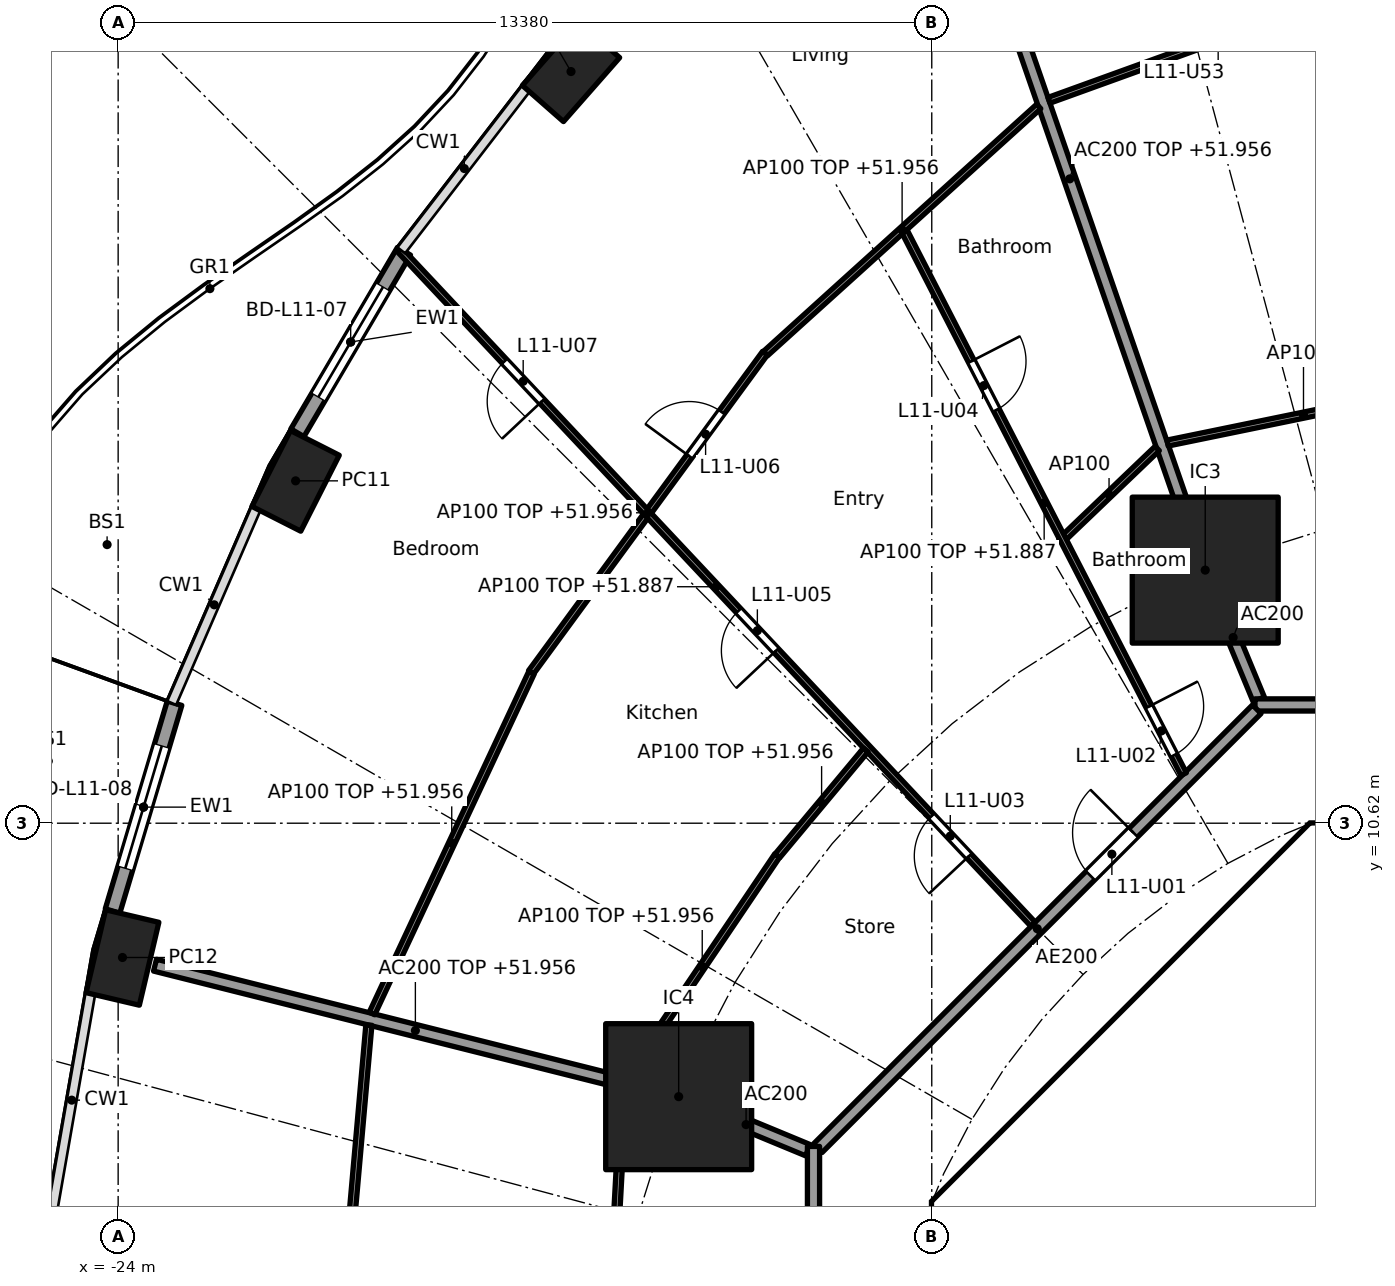
"""IFC4 building model, lengths in metres.
Left out: names, types, materials, properties, quantities, classifications, styles, units other than length and angle.
Written with IfcOpenShell. Run it as: python <this file> out.ifc"""

import sys

from ifc_helpers import new_model, si_unit, direction, frame, frame_2d, origin, origin_2d, place, context, subcontext, project, spatial, polyline, rectangle, hollow_rectangle, outline, extrude, element, fill, save


model = new_model("IFC4")
c1 = context("Model", 3, precision=1e-05, world=origin(), true_north=direction((0.0, 1.0)))
c2 = subcontext(c1, "Body", "Model", "MODEL_VIEW")
j1 = project(units=[si_unit("LENGTHUNIT", "METRE"), si_unit("PLANEANGLEUNIT", "RADIAN")], contexts=[c1])
p1 = place(None, origin())
s1 = spatial("IfcSite", under=j1, at=p1, CompositionType="ELEMENT")
p2 = place(p1, origin())
s2 = spatial("IfcBuilding", under=s1, at=p2, CompositionType="ELEMENT")
p3 = place(p2, frame((0.0, 0.0, 49.2)))
s3 = spatial("IfcBuildingStorey", under=s2, at=p3, CompositionType="ELEMENT", Elevation=49.2)
for number, where, z_axis, x_axis in (
    (1, (-16.552, 22.981, 0.0), (0.0, 0.0, 1.0), (-0.66, -0.751, 0.0)),
    (2, (-21.082, 16.25, 0.0), (0.0, 0.0, 1.0), (-0.452, -0.892, 0.0)),
    (3, (-23.929, 8.412, 0.0), (0.0, 0.0, 1.0), (-0.229, -0.973, 0.0)),
):
    element("IfcColumn", number, at=place(p3, frame(where, z_axis=z_axis, x_axis=x_axis)), inside=s3, PredefinedType="COLUMN", context=c2, shape_type="SweptSolid", body=[
        extrude(hollow_rectangle(XDim=1.4, YDim=0.9, WallThickness=0.05, at=origin_2d()), origin(), (0.0, 0.0, 1.0), 3.7),
    ])
for number, where, z_axis, x_axis in (
    (4, (-6.123, 14.782, 0.0), (0.0, 0.0, 1.0), (1.0, 0.0, 0.0)),
    (5, (-14.782, 6.123, 0.0), (0.0, 0.0, 1.0), (1.0, 0.0, 0.0)),
):
    element("IfcColumn", number, at=place(p3, frame(where, z_axis=z_axis, x_axis=x_axis)), inside=s3, PredefinedType="COLUMN", context=c2, shape_type="SweptSolid", body=[
        extrude(rectangle(XDim=2.4, YDim=2.4, at=origin_2d()), origin(), (0.0, 0.0, 1.0), 3.7),
    ])
p4 = place(p3, frame((-21.052, 17.04, 0.0), z_axis=(0.0, 0.0, 1.0), x_axis=(0.506311160839, 0.862350861546, 0.0)))
e6 = element("IfcWall", 6, at=p4, inside=s3, PredefinedType="SOLIDWALL", context=c2, shape_type="SweptSolid", body=[
    extrude(rectangle(XDim=3.462, YDim=0.25, at=frame_2d((1.731, 0.0))), origin(), (0.0, 0.0, 1.0), 3.44),
])
p5 = place(p4, frame((0.681, 0.0, 0.0)))
e7 = element("IfcOpeningElement", 7, at=p5, cuts=e6, PredefinedType="OPENING", context=c2, shape_type="SweptSolid", body=[
    extrude(rectangle(XDim=2.1, YDim=2.4, at=frame_2d((1.05, 1.2))), frame((0.0, 0.135, 0.0), z_axis=(0.0, -1.0, 0.0), x_axis=(1.0, 0.0, 0.0)), (0.0, 0.0, 1.0), 0.27),
])
p6 = place(p3, frame((-24.092, 9.176, 0.0), z_axis=(0.0, 0.0, 1.0), x_axis=(0.285871309426, 0.958268018065, 0.0)))
e8 = element("IfcWall", 8, at=p6, inside=s3, PredefinedType="SOLIDWALL", context=c2, shape_type="SweptSolid", body=[
    extrude(rectangle(XDim=3.565, YDim=0.25, at=frame_2d((1.783, 0.0))), origin(), (0.0, 0.0, 1.0), 3.44),
])
p7 = place(p6, frame((0.733, 0.0, 0.0)))
e9 = element("IfcOpeningElement", 9, at=p7, cuts=e8, PredefinedType="OPENING", context=c2, shape_type="SweptSolid", body=[
    extrude(rectangle(XDim=2.1, YDim=2.4, at=frame_2d((1.05, 1.2))), frame((0.0, 0.135, 0.0), z_axis=(0.0, -1.0, 0.0), x_axis=(1.0, 0.0, 0.0)), (0.0, 0.0, 1.0), 0.27),
])
p8 = place(p3, frame((-4.613, 9.988, 0.0), z_axis=(0.0, 0.0, 1.0), x_axis=(-0.707106781187, -0.707106781187, 0.0)))
e10 = element("IfcWall", 10, at=p8, inside=s3, PredefinedType="SHEAR", context=c2, shape_type="SweptSolid", body=[
    extrude(rectangle(XDim=7.602, YDim=0.6, at=frame_2d((3.801, 0.0))), origin(), (0.0, 0.0, 1.0), 3.44),
])
p9 = place(p8, frame((0.351, 0.0, 0.0)))
e11 = element("IfcOpeningElement", 11, at=p9, cuts=e10, PredefinedType="OPENING", context=c2, shape_type="SweptSolid", body=[
    extrude(rectangle(XDim=1.1, YDim=2.1, at=frame_2d((0.55, 1.05))), frame((0.0, 0.31, 0.0), z_axis=(0.0, -1.0, 0.0), x_axis=(1.0, 0.0, 0.0)), (0.0, 0.0, 1.0), 0.62),
])
p10 = place(p3, frame((-5.8, 4.3, 0.0), z_axis=(0.0, 0.0, 1.0), x_axis=(0.0, 1.0, 0.0)))
e12 = element("IfcWall", 12, at=p10, inside=s3, PredefinedType="PARTITIONING", context=c2, shape_type="SweptSolid", body=[
    extrude(rectangle(XDim=3.927, YDim=0.15, at=frame_2d((1.963, 0.0))), origin(), (0.0, 0.0, 1.0), 3.44),
])
p11 = place(p10, frame((1.551, 0.0, 0.0)))
e13 = element("IfcOpeningElement", 13, at=p11, cuts=e12, PredefinedType="OPENING", context=c2, shape_type="SweptSolid", body=[
    extrude(rectangle(XDim=0.9, YDim=2.1, at=frame_2d((0.45, 1.05))), frame((0.0, 0.085, 0.0), z_axis=(0.0, -1.0, 0.0), x_axis=(1.0, 0.0, 0.0)), (0.0, 0.0, 1.0), 0.17),
])
p12 = place(p3, origin())
e14 = element("IfcWall", 14, at=p12, inside=s3, PredefinedType="SHEAR", context=c2, shape_type="SweptSolid", body=[
    extrude(outline(polyline([(-10.2, 4.825), (-9.776, 4.401), (-10.025, 4.152), (-10.025, 3.801), (-10.625, 3.801), (-10.625, 4.401), (-10.2, 4.825)])), origin(), (0.0, 0.0, 1.0), 3.44),
])
p13 = place(p3, origin())
e15 = element("IfcWall", 15, at=p13, inside=s3, PredefinedType="SHEAR", context=c2, shape_type="SweptSolid", body=[
    extrude(outline(polyline([(-4.152, 10.025), (-4.401, 9.776), (-4.825, 10.2), (-4.401, 10.625), (4.401, 10.625), (4.825, 10.2), (4.401, 9.776), (4.152, 10.025), (-4.152, 10.025)])), origin(), (0.0, 0.0, 1.0), 3.44),
])
p14 = place(p3, frame((-5.243, 12.657, 0.0), z_axis=(0.0, 0.0, 1.0), x_axis=(-0.382668627144, 0.923885664896, 0.0)))
e16 = element("IfcWall", 16, at=p14, inside=s3, PredefinedType="PARTITIONING", context=c2, shape_type="SweptSolid", body=[
    extrude(rectangle(XDim=2.2, YDim=0.2, at=frame_2d((1.1, 0.0))), origin(), (0.0, 0.0, 1.0), 3.44),
])
p15 = place(p3, frame((-6.139, 14.829, 0.0), z_axis=(0.0, 0.0, 1.0), x_axis=(-0.327178799566, 0.944962450637, 0.0)))
e17 = element("IfcWall", 17, at=p15, inside=s3, PredefinedType="PARTITIONING", context=c2, shape_type="SweptSolid", body=[
    extrude(rectangle(XDim=13.517, YDim=0.2, at=frame_2d((6.759, 0.0))), origin(), (0.0, 0.0, 1.0), 2.756),
])
p16 = place(p3, frame((-12.657, 5.243, 0.0), z_axis=(0.0, 0.0, 1.0), x_axis=(-0.923885664896, 0.382668627144, 0.0)))
e18 = element("IfcWall", 18, at=p16, inside=s3, PredefinedType="PARTITIONING", context=c2, shape_type="SweptSolid", body=[
    extrude(rectangle(XDim=2.2, YDim=0.2, at=frame_2d((1.1, 0.0))), origin(), (0.0, 0.0, 1.0), 3.44),
])
p17 = place(p3, frame((-14.831, 6.135, 0.0), z_axis=(0.0, 0.0, 1.0), x_axis=(-0.969884949569, 0.243563512454, 0.0)))
e19 = element("IfcWall", 19, at=p17, inside=s3, PredefinedType="PARTITIONING", context=c2, shape_type="SweptSolid", body=[
    extrude(rectangle(XDim=8.829, YDim=0.2, at=frame_2d((4.415, 0.0))), origin(), (0.0, 0.0, 1.0), 2.756),
])
p18 = place(p3, frame((5.104, 12.565, 0.0), z_axis=(0.0, 0.0, 1.0), x_axis=(-1.0, 0.0, 0.0)))
e20 = element("IfcWall", 20, at=p18, inside=s3, PredefinedType="PARTITIONING", context=c2, shape_type="SweptSolid", body=[
    extrude(rectangle(XDim=10.409, YDim=0.2, at=frame_2d((5.205, 0.0))), origin(), (0.0, 0.0, 1.0), 3.44),
])
p19 = place(p18, frame((1.185, 0.0, 0.0)))
e21 = element("IfcOpeningElement", 21, at=p19, cuts=e20, PredefinedType="OPENING", context=c2, shape_type="SweptSolid", body=[
    extrude(rectangle(XDim=1.0, YDim=2.1, at=frame_2d((0.5, 1.05))), frame((0.0, 0.11, 0.0), z_axis=(0.0, -1.0, 0.0), x_axis=(1.0, 0.0, 0.0)), (0.0, 0.0, 1.0), 0.22),
])
p20 = place(p3, frame((-5.275, 12.494, 0.0), z_axis=(0.0, 0.0, 1.0), x_axis=(-0.707106781187, -0.707106781187, 0.0)))
e22 = element("IfcWall", 22, at=p20, inside=s3, PredefinedType="PARTITIONING", context=c2, shape_type="SweptSolid", body=[
    extrude(rectangle(XDim=10.209, YDim=0.2, at=frame_2d((5.104, 0.0))), origin(), (0.0, 0.0, 1.0), 3.44),
])
p21 = place(p20, frame((2.87, 0.0, 0.0)))
e23 = element("IfcOpeningElement", 23, at=p21, cuts=e22, PredefinedType="OPENING", context=c2, shape_type="SweptSolid", body=[
    extrude(rectangle(XDim=1.0, YDim=2.1, at=frame_2d((0.5, 1.05))), frame((0.0, 0.11, 0.0), z_axis=(0.0, -1.0, 0.0), x_axis=(1.0, 0.0, 0.0)), (0.0, 0.0, 1.0), 0.22),
])
p22 = place(p3, frame((-12.565, 5.304, 0.0), z_axis=(0.0, 0.0, 1.0), x_axis=(0.0, -1.0, 0.0)))
e24 = element("IfcWall", 24, at=p22, inside=s3, PredefinedType="PARTITIONING", context=c2, shape_type="SweptSolid", body=[
    extrude(rectangle(XDim=10.409, YDim=0.2, at=frame_2d((5.205, 0.0))), origin(), (0.0, 0.0, 1.0), 3.44),
])
p23 = place(p22, frame((6.106, 0.0, 0.0)))
e25 = element("IfcOpeningElement", 25, at=p23, cuts=e24, PredefinedType="OPENING", context=c2, shape_type="SweptSolid", body=[
    extrude(rectangle(XDim=1.0, YDim=2.1, at=frame_2d((0.5, 1.05))), frame((0.0, 0.11, 0.0), z_axis=(0.0, -1.0, 0.0), x_axis=(1.0, 0.0, 0.0)), (0.0, 0.0, 1.0), 0.22),
])
p24 = place(p3, frame((-2.272, 17.789, 0.0), z_axis=(0.0, 0.0, 1.0), x_axis=(-0.979595137747, -0.200981009307, 0.0)))
e26 = element("IfcWall", 26, at=p24, inside=s3, PredefinedType="PARTITIONING", context=c2, shape_type="SweptSolid", body=[
    extrude(rectangle(XDim=4.562, YDim=0.1, at=frame_2d((2.281, 0.0))), origin(), (0.0, 0.0, 1.0), 2.756),
])
p25 = place(p3, frame((-3.128, 24.521, 0.0), z_axis=(0.0, 0.0, 1.0), x_axis=(-0.940401494588, -0.340066212636, 0.0)))
e27 = element("IfcWall", 27, at=p25, inside=s3, PredefinedType="PARTITIONING", context=c2, shape_type="SweptSolid", body=[
    extrude(rectangle(XDim=5.917, YDim=0.1, at=frame_2d((2.958, 0.0))), origin(), (0.0, 0.0, 1.0), 2.756),
])
p26 = place(p25, frame((2.509, 0.0, 0.0)))
e28 = element("IfcOpeningElement", 28, at=p26, cuts=e27, PredefinedType="OPENING", context=c2, shape_type="SweptSolid", body=[
    extrude(rectangle(XDim=0.9, YDim=2.1, at=frame_2d((0.45, 1.05))), frame((0.0, 0.06, 0.0), z_axis=(0.0, -1.0, 0.0), x_axis=(1.0, 0.0, 0.0)), (0.0, 0.0, 1.0), 0.12),
])
p27 = place(p3, frame((-6.912, 16.782, 0.0), z_axis=(0.0, 0.0, 1.0), x_axis=(-0.722789289931, -0.691068478778, 0.0)))
e29 = element("IfcWall", 29, at=p27, inside=s3, PredefinedType="PARTITIONING", context=c2, shape_type="SweptSolid", body=[
    extrude(rectangle(XDim=2.194, YDim=0.1, at=frame_2d((1.097, 0.0))), origin(), (0.0, 0.0, 1.0), 3.44),
])
p28 = place(p3, frame((-8.861, 22.407, 0.0), z_axis=(0.0, 0.0, 1.0), x_axis=(-0.741713303551, -0.670717060567, 0.0)))
e30 = element("IfcWall", 30, at=p28, inside=s3, PredefinedType="PARTITIONING", context=c2, shape_type="SweptSolid", body=[
    extrude(rectangle(XDim=6.059, YDim=0.1, at=frame_2d((3.03, 0.0))), origin(), (0.0, 0.0, 1.0), 2.756),
])
p29 = place(p3, frame((-6.477, 11.427, 0.0), z_axis=(0.0, 0.0, 1.0), x_axis=(-0.457464037982, 0.889228122561, 0.0)))
e31 = element("IfcWall", 31, at=p29, inside=s3, PredefinedType="PARTITIONING", context=c2, shape_type="SweptSolid", body=[
    extrude(rectangle(XDim=10.032, YDim=0.1, at=frame_2d((5.016, 0.0))), origin(), (0.0, 0.0, 1.0), 2.687),
])
p30 = place(p29, frame((0.35, 0.0, 0.0)))
e32 = element("IfcOpeningElement", 32, at=p30, cuts=e31, PredefinedType="OPENING", context=c2, shape_type="SweptSolid", body=[
    extrude(rectangle(XDim=0.9, YDim=2.1, at=frame_2d((0.45, 1.05))), frame((0.0, 0.06, 0.0), z_axis=(0.0, -1.0, 0.0), x_axis=(1.0, 0.0, 0.0)), (0.0, 0.0, 1.0), 0.12),
])
p31 = place(p29, frame((6.735, 0.0, 0.0)))
e33 = element("IfcOpeningElement", 33, at=p31, cuts=e31, PredefinedType="OPENING", context=c2, shape_type="SweptSolid", body=[
    extrude(rectangle(XDim=0.9, YDim=2.1, at=frame_2d((0.45, 1.05))), frame((0.0, 0.06, 0.0), z_axis=(0.0, -1.0, 0.0), x_axis=(1.0, 0.0, 0.0)), (0.0, 0.0, 1.0), 0.12),
])
p32 = place(p3, frame((-13.362, 18.35, 0.0), z_axis=(0.0, 0.0, 1.0), x_axis=(-0.591191311491, -0.806531359104, 0.0)))
e34 = element("IfcWall", 34, at=p32, inside=s3, PredefinedType="PARTITIONING", context=c2, shape_type="SweptSolid", body=[
    extrude(rectangle(XDim=6.51, YDim=0.1, at=frame_2d((3.255, 0.0))), origin(), (0.0, 0.0, 1.0), 2.756),
])
p33 = place(p32, frame((1.202, 0.0, 0.0)))
e35 = element("IfcOpeningElement", 35, at=p33, cuts=e34, PredefinedType="OPENING", context=c2, shape_type="SweptSolid", body=[
    extrude(rectangle(XDim=0.9, YDim=2.1, at=frame_2d((0.45, 1.05))), frame((0.0, 0.06, 0.0), z_axis=(0.0, -1.0, 0.0), x_axis=(1.0, 0.0, 0.0)), (0.0, 0.0, 1.0), 0.12),
])
p34 = place(p3, frame((-8.953, 8.958, 0.0), z_axis=(0.0, 0.0, 1.0), x_axis=(-0.684574307023, 0.728943082939, 0.0)))
e36 = element("IfcWall", 36, at=p34, inside=s3, PredefinedType="PARTITIONING", context=c2, shape_type="SweptSolid", body=[
    extrude(rectangle(XDim=15.231, YDim=0.1, at=frame_2d((7.615, 0.0))), origin(), (0.0, 0.0, 1.0), 2.687),
])
p35 = place(p34, frame((1.54, 0.0, 0.0)))
e37 = element("IfcOpeningElement", 37, at=p35, cuts=e36, PredefinedType="OPENING", context=c2, shape_type="SweptSolid", body=[
    extrude(rectangle(XDim=0.9, YDim=2.1, at=frame_2d((0.45, 1.05))), frame((0.0, 0.06, 0.0), z_axis=(0.0, -1.0, 0.0), x_axis=(1.0, 0.0, 0.0)), (0.0, 0.0, 1.0), 0.12),
])
p36 = place(p34, frame((6.174, 0.0, 0.0)))
e38 = element("IfcOpeningElement", 38, at=p36, cuts=e36, PredefinedType="OPENING", context=c2, shape_type="SweptSolid", body=[
    extrude(rectangle(XDim=0.9, YDim=2.1, at=frame_2d((0.45, 1.05))), frame((0.0, 0.06, 0.0), z_axis=(0.0, -1.0, 0.0), x_axis=(1.0, 0.0, 0.0)), (0.0, 0.0, 1.0), 0.12),
])
p37 = place(p34, frame((11.8, 0.0, 0.0)))
e39 = element("IfcOpeningElement", 39, at=p37, cuts=e36, PredefinedType="OPENING", context=c2, shape_type="SweptSolid", body=[
    extrude(rectangle(XDim=0.9, YDim=2.1, at=frame_2d((0.45, 1.05))), frame((0.0, 0.06, 0.0), z_axis=(0.0, -1.0, 0.0), x_axis=(1.0, 0.0, 0.0)), (0.0, 0.0, 1.0), 0.12),
])
p38 = place(p3, frame((-11.705, 11.825, 0.0), z_axis=(0.0, 0.0, 1.0), x_axis=(-0.640861724905, -0.767656335577, 0.0)))
e40 = element("IfcWall", 40, at=p38, inside=s3, PredefinedType="PARTITIONING", context=c2, shape_type="SweptSolid", body=[
    extrude(rectangle(XDim=2.268, YDim=0.1, at=frame_2d((1.134, 0.0))), origin(), (0.0, 0.0, 1.0), 2.756),
])
p39 = place(p3, frame((-13.162, 10.087, 0.0), z_axis=(0.0, 0.0, 1.0), x_axis=(-0.55912750241, -0.829081682375, 0.0)))
e41 = element("IfcWall", 41, at=p39, inside=s3, PredefinedType="PARTITIONING", context=c2, shape_type="SweptSolid", body=[
    extrude(rectangle(XDim=4.408, YDim=0.1, at=frame_2d((2.204, 0.0))), origin(), (0.0, 0.0, 1.0), 2.756),
])
p40 = place(p3, frame((-17.203, 13.095, 0.0), z_axis=(0.0, 0.0, 1.0), x_axis=(-0.423926333401, -0.905696673202, 0.0)))
e42 = element("IfcWall", 42, at=p40, inside=s3, PredefinedType="PARTITIONING", context=c2, shape_type="SweptSolid", body=[
    extrude(rectangle(XDim=6.188, YDim=0.1, at=frame_2d((3.094, 0.0))), origin(), (0.0, 0.0, 1.0), 2.756),
])
p41 = place(p3, frame((-15.688, 6.249, 0.0), z_axis=(0.0, 0.0, 1.0), x_axis=(-0.054659814056, -0.998505034903, 0.0)))
e43 = element("IfcWall", 43, at=p41, inside=s3, PredefinedType="PARTITIONING", context=c2, shape_type="SweptSolid", body=[
    extrude(rectangle(XDim=6.208, YDim=0.1, at=frame_2d((3.104, 0.0))), origin(), (0.0, 0.0, 1.0), 2.756),
])
p42 = place(p3, frame((-19.877, 7.301, 0.0), z_axis=(0.0, 0.0, 1.0), x_axis=(-0.088143415068, -0.996107794558, 0.0)))
e44 = element("IfcWall", 44, at=p42, inside=s3, PredefinedType="PARTITIONING", context=c2, shape_type="SweptSolid", body=[
    extrude(rectangle(XDim=7.279, YDim=0.1, at=frame_2d((3.64, 0.0))), origin(), (0.0, 0.0, 1.0), 2.756),
])
p43 = place(p42, frame((3.189, 0.0, 0.0)))
e45 = element("IfcOpeningElement", 45, at=p43, cuts=e44, PredefinedType="OPENING", context=c2, shape_type="SweptSolid", body=[
    extrude(rectangle(XDim=0.9, YDim=2.1, at=frame_2d((0.45, 1.05))), frame((0.0, 0.06, 0.0), z_axis=(0.0, -1.0, 0.0), x_axis=(1.0, 0.0, 0.0)), (0.0, 0.0, 1.0), 0.12),
])
p44 = place(p5, origin())
e46 = element("IfcDoor", 46, at=p44, inside=s3, OperationType="SLIDING_TO_LEFT", PredefinedType="DOOR", context=c2, shape_type="SweptSolid", body=[
    extrude(rectangle(XDim=2.1, YDim=2.4, at=frame_2d((1.05, 1.2))), frame((0.0, 0.025, 0.0), z_axis=(0.0, -1.0, 0.0), x_axis=(1.0, 0.0, 0.0)), (0.0, 0.0, 1.0), 0.05),
])
fill(e7, e46)
p45 = place(p7, origin())
e47 = element("IfcDoor", 47, at=p45, inside=s3, OperationType="SLIDING_TO_LEFT", PredefinedType="DOOR", context=c2, shape_type="SweptSolid", body=[
    extrude(rectangle(XDim=2.1, YDim=2.4, at=frame_2d((1.05, 1.2))), frame((0.0, 0.025, 0.0), z_axis=(0.0, -1.0, 0.0), x_axis=(1.0, 0.0, 0.0)), (0.0, 0.0, 1.0), 0.05),
])
fill(e9, e47)
p46 = place(p11, origin())
e48 = element("IfcDoor", 48, at=p46, inside=s3, OperationType="SINGLE_SWING_LEFT", PredefinedType="DOOR", context=c2, shape_type="SweptSolid", body=[
    extrude(rectangle(XDim=0.9, YDim=2.1, at=frame_2d((0.45, 1.05))), frame((0.0, 0.025, 0.0), z_axis=(0.0, -1.0, 0.0), x_axis=(1.0, 0.0, 0.0)), (0.0, 0.0, 1.0), 0.05),
])
fill(e13, e48)
p47 = place(p9, origin())
e49 = element("IfcDoor", 49, at=p47, inside=s3, OperationType="SINGLE_SWING_RIGHT", PredefinedType="DOOR", context=c2, shape_type="SweptSolid", body=[
    extrude(rectangle(XDim=1.1, YDim=2.1, at=frame_2d((0.55, 1.05))), frame((0.0, 0.025, 0.0), z_axis=(0.0, -1.0, 0.0), x_axis=(1.0, 0.0, 0.0)), (0.0, 0.0, 1.0), 0.05),
])
fill(e11, e49)
p48 = place(p21, frame((1.0, 0.0, 0.0), x_axis=(-1.0, 0.0, 0.0)))
e50 = element("IfcDoor", 50, at=p48, inside=s3, OperationType="SINGLE_SWING_RIGHT", PredefinedType="DOOR", context=c2, shape_type="SweptSolid", body=[
    extrude(rectangle(XDim=1.0, YDim=2.1, at=frame_2d((0.5, 1.05))), frame((0.0, 0.025, 0.0), z_axis=(0.0, -1.0, 0.0), x_axis=(1.0, 0.0, 0.0)), (0.0, 0.0, 1.0), 0.05),
])
fill(e23, e50)
p49 = place(p30, frame((0.9, 0.0, 0.0), x_axis=(-1.0, 0.0, 0.0)))
e51 = element("IfcDoor", 51, at=p49, inside=s3, OperationType="SINGLE_SWING_LEFT", PredefinedType="DOOR", context=c2, shape_type="SweptSolid", body=[
    extrude(rectangle(XDim=0.9, YDim=2.1, at=frame_2d((0.45, 1.05))), frame((0.0, 0.025, 0.0), z_axis=(0.0, -1.0, 0.0), x_axis=(1.0, 0.0, 0.0)), (0.0, 0.0, 1.0), 0.05),
])
fill(e32, e51)
p50 = place(p35, origin())
e52 = element("IfcDoor", 52, at=p50, inside=s3, OperationType="SINGLE_SWING_LEFT", PredefinedType="DOOR", context=c2, shape_type="SweptSolid", body=[
    extrude(rectangle(XDim=0.9, YDim=2.1, at=frame_2d((0.45, 1.05))), frame((0.0, 0.025, 0.0), z_axis=(0.0, -1.0, 0.0), x_axis=(1.0, 0.0, 0.0)), (0.0, 0.0, 1.0), 0.05),
])
fill(e37, e52)
p51 = place(p31, frame((0.9, 0.0, 0.0), x_axis=(-1.0, 0.0, 0.0)))
e53 = element("IfcDoor", 53, at=p51, inside=s3, OperationType="SINGLE_SWING_LEFT", PredefinedType="DOOR", context=c2, shape_type="SweptSolid", body=[
    extrude(rectangle(XDim=0.9, YDim=2.1, at=frame_2d((0.45, 1.05))), frame((0.0, 0.025, 0.0), z_axis=(0.0, -1.0, 0.0), x_axis=(1.0, 0.0, 0.0)), (0.0, 0.0, 1.0), 0.05),
])
fill(e33, e53)
p52 = place(p36, origin())
e54 = element("IfcDoor", 54, at=p52, inside=s3, OperationType="SINGLE_SWING_LEFT", PredefinedType="DOOR", context=c2, shape_type="SweptSolid", body=[
    extrude(rectangle(XDim=0.9, YDim=2.1, at=frame_2d((0.45, 1.05))), frame((0.0, 0.025, 0.0), z_axis=(0.0, -1.0, 0.0), x_axis=(1.0, 0.0, 0.0)), (0.0, 0.0, 1.0), 0.05),
])
fill(e38, e54)
p53 = place(p33, frame((0.9, 0.0, 0.0), x_axis=(-1.0, 0.0, 0.0)))
e55 = element("IfcDoor", 55, at=p53, inside=s3, OperationType="SINGLE_SWING_LEFT", PredefinedType="DOOR", context=c2, shape_type="SweptSolid", body=[
    extrude(rectangle(XDim=0.9, YDim=2.1, at=frame_2d((0.45, 1.05))), frame((0.0, 0.025, 0.0), z_axis=(0.0, -1.0, 0.0), x_axis=(1.0, 0.0, 0.0)), (0.0, 0.0, 1.0), 0.05),
])
fill(e35, e55)
p54 = place(p37, origin())
e56 = element("IfcDoor", 56, at=p54, inside=s3, OperationType="SINGLE_SWING_LEFT", PredefinedType="DOOR", context=c2, shape_type="SweptSolid", body=[
    extrude(rectangle(XDim=0.9, YDim=2.1, at=frame_2d((0.45, 1.05))), frame((0.0, 0.025, 0.0), z_axis=(0.0, -1.0, 0.0), x_axis=(1.0, 0.0, 0.0)), (0.0, 0.0, 1.0), 0.05),
])
fill(e39, e56)
save(model, sys.argv[1])
